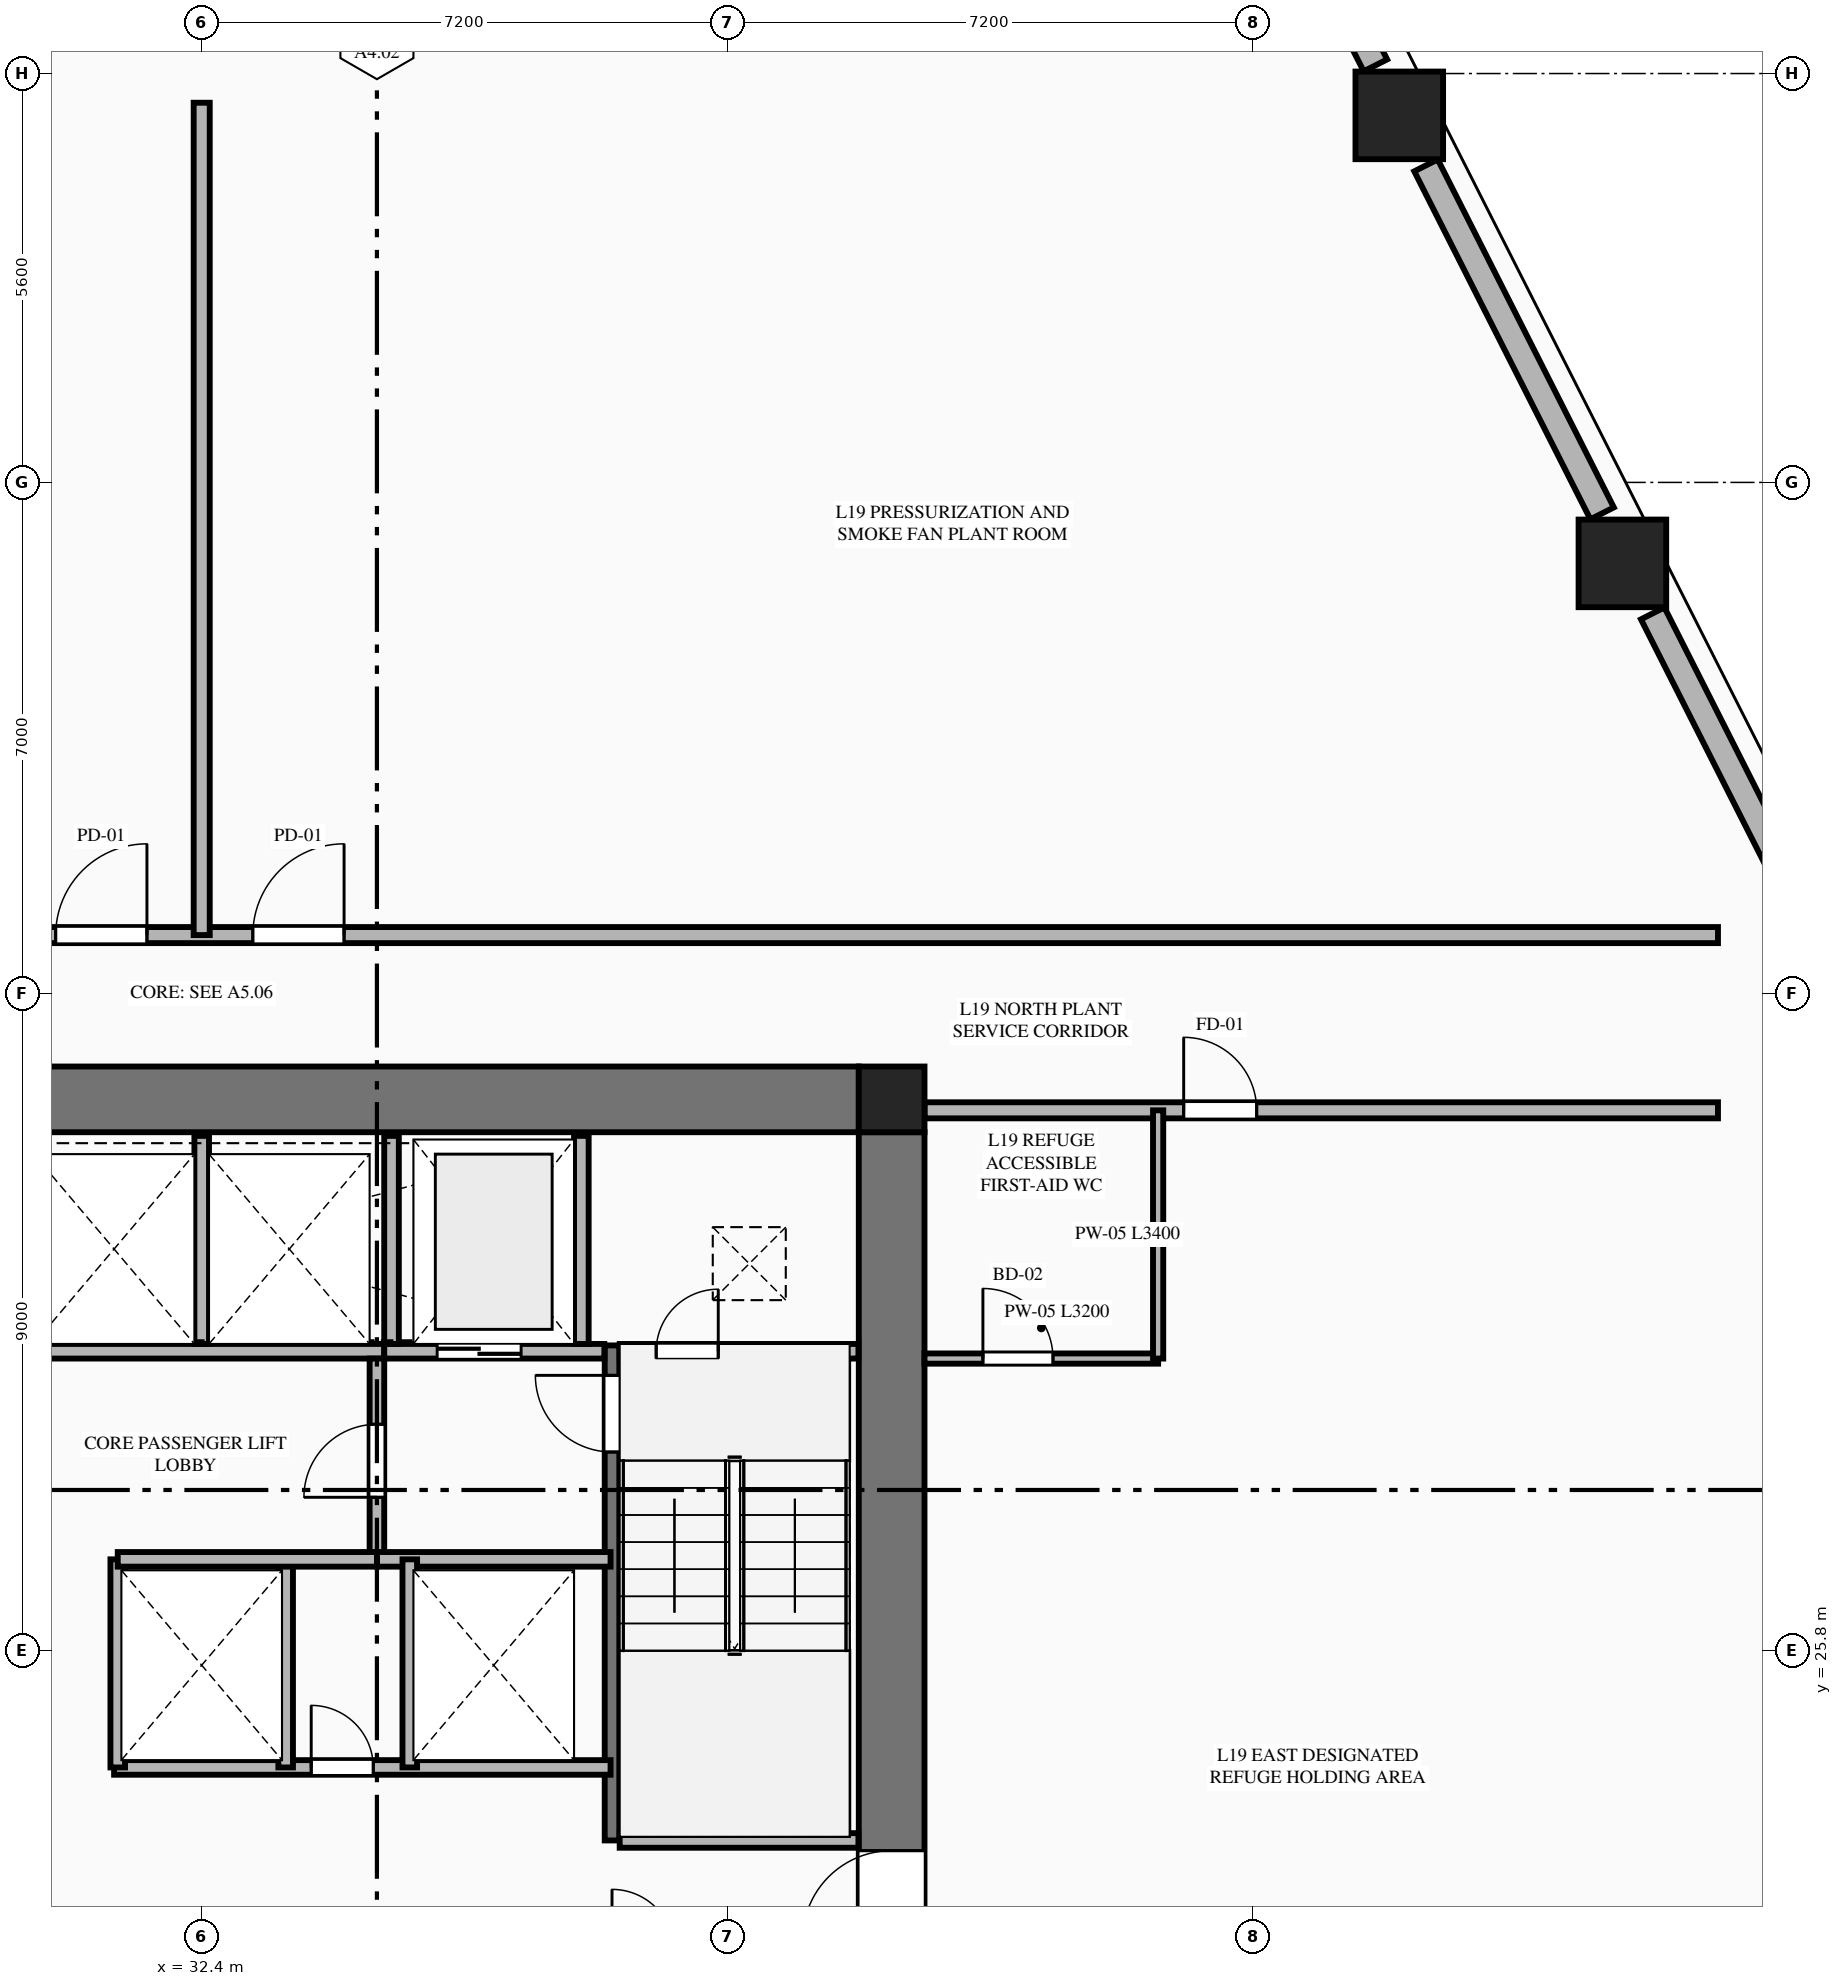
"""IFC4 building model, lengths in metres.
Left out: names, types, materials, properties, quantities, classifications, styles, units other than length and angle.
Written with IfcOpenShell. Run it as: python <this file> out.ifc"""

import sys

from ifc_helpers import new_model, si_unit, direction, frame, frame_2d, origin, origin_2d, place, context, subcontext, project, spatial, rectangle, extrude, element, fill, save


model = new_model("IFC4")
c1 = context("Model", 3, precision=1e-05, world=origin(), true_north=direction((0.0, 1.0)))
c2 = subcontext(c1, "Body", "Model", "MODEL_VIEW")
j1 = project(units=[si_unit("LENGTHUNIT", "METRE"), si_unit("PLANEANGLEUNIT", "RADIAN")], contexts=[c1])
p1 = place(None, origin())
s1 = spatial("IfcSite", under=j1, at=p1, CompositionType="ELEMENT")
p2 = place(p1, origin())
s2 = spatial("IfcBuilding", under=s1, at=p2, CompositionType="ELEMENT")
p3 = place(p2, frame((0.0, 0.0, 74.6)))
s3 = spatial("IfcBuildingStorey", under=s2, at=p3, CompositionType="ELEMENT", Elevation=74.6)
p4 = place(p3, frame((41.85, 33.35, 0.0), z_axis=(0.0, 0.0, 1.0), x_axis=(1.0, 0.0, 0.0)))
e1 = element("IfcColumn", 1, at=p4, inside=s3, PredefinedType="COLUMN", context=c2, shape_type="SweptSolid", body=[
    extrude(rectangle(XDim=0.9, YDim=0.9, at=origin_2d()), origin(), (0.0, 0.0, 1.0), 5.4),
])
p5 = place(p3, frame((23.4, 33.35, 0.0), z_axis=(0.0, 0.0, 1.0), x_axis=(1.0, 0.0, 0.0)))
e2 = element("IfcWall", 2, at=p5, inside=s3, PredefinedType="SHEAR", context=c2, shape_type="SweptSolid", body=[
    extrude(rectangle(XDim=18.0, YDim=0.9, at=frame_2d((9.0, 0.0))), origin(), (0.0, 0.0, 1.0), 5.18),
])
p6 = place(p3, frame((41.85, 18.9, 0.0), z_axis=(0.0, 0.0, 1.0), x_axis=(0.0, 1.0, 0.0)))
e3 = element("IfcWall", 3, at=p6, inside=s3, PredefinedType="SHEAR", context=c2, shape_type="SweptSolid", body=[
    extrude(rectangle(XDim=14.0, YDim=0.9, at=frame_2d((7.0, 0.0))), origin(), (0.0, 0.0, 1.0), 5.18),
])
p7 = place(p6, frame((2.94, 0.0, 0.0)))
e4 = element("IfcOpeningElement", 4, at=p7, cuts=e3, PredefinedType="OPENING", context=c2, shape_type="SweptSolid", body=[
    extrude(rectangle(XDim=1.22, YDim=2.25, at=frame_2d((0.61, 1.125))), frame((0.0, 0.46, 0.0), z_axis=(0.0, -1.0, 0.0), x_axis=(1.0, 0.0, 0.0)), (0.0, 0.0, 1.0), 0.92),
])
for number, where, z_axis, x_axis in (
    (5, (51.859, 40.691, 0.0), (0.0, 0.0, 1.0), (1.0, 0.0, 0.0)),
    (6, (48.803, 46.827, 0.0), (0.0, 0.0, 1.0), (1.0, 0.0, 0.0)),
):
    element("IfcColumn", number, at=place(p3, frame(where, z_axis=z_axis, x_axis=x_axis)), inside=s3, PredefinedType="COLUMN", context=c2, shape_type="SweptSolid", body=[
        extrude(rectangle(XDim=1.2, YDim=1.2, at=origin_2d()), origin(), (0.0, 0.0, 1.0), 5.4),
    ])
p8 = place(p3, frame((38.02, 23.2, 0.0), z_axis=(0.0, 0.0, 1.0), x_axis=(0.0, 1.0, 0.0)))
e7 = element("IfcWall", 7, at=p8, inside=s3, PredefinedType="SHEAR", context=c2, shape_type="SweptSolid", body=[
    extrude(rectangle(XDim=6.78, YDim=0.2, at=frame_2d((3.39, 0.0))), origin(), (0.0, 0.0, 1.0), 5.4),
])
p9 = place(p8, frame((5.32, 0.0, 0.0)))
e8 = element("IfcOpeningElement", 8, at=p9, cuts=e7, PredefinedType="OPENING", context=c2, shape_type="SweptSolid", body=[
    extrude(rectangle(XDim=1.05, YDim=2.15, at=frame_2d((0.525, 1.075))), frame((0.0, 0.11, 0.0), z_axis=(0.0, -1.0, 0.0), x_axis=(1.0, 0.0, 0.0)), (0.0, 0.0, 1.0), 0.22),
])
p10 = place(p3, frame((38.125, 23.2, 0.0), z_axis=(0.0, 0.0, 1.0), x_axis=(1.0, 0.0, 0.0)))
e9 = element("IfcWall", 9, at=p10, inside=s3, PredefinedType="PLUMBINGWALL", context=c2, shape_type="SweptSolid", body=[
    extrude(rectangle(XDim=3.27, YDim=0.2, at=frame_2d((1.635, 0.0))), origin(), (0.0, 0.0, 1.0), 5.18),
])
p11 = place(p3, frame((29.9, 29.9, 0.0), z_axis=(0.0, 0.0, 1.0), x_axis=(1.0, 0.0, 0.0)))
e10 = element("IfcWall", 10, at=p11, inside=s3, PredefinedType="PLUMBINGWALL", context=c2, shape_type="SweptSolid", body=[
    extrude(rectangle(XDim=5.0, YDim=0.2, at=frame_2d((2.5, 0.0))), origin(), (0.0, 0.0, 1.0), 5.18),
])
p12 = place(p3, frame((34.9, 29.9, 0.0), z_axis=(0.0, 0.0, 1.0), x_axis=(1.0, 0.0, 0.0)))
e11 = element("IfcWall", 11, at=p12, inside=s3, PredefinedType="PLUMBINGWALL", context=c2, shape_type="SweptSolid", body=[
    extrude(rectangle(XDim=3.015, YDim=0.2, at=frame_2d((1.508, 0.0))), origin(), (0.0, 0.0, 1.0), 5.18),
])
p13 = place(p12, frame((0.725, 0.0, 0.0)))
e12 = element("IfcOpeningElement", 12, at=p13, cuts=e11, PredefinedType="OPENING", context=c2, shape_type="SweptSolid", body=[
    extrude(rectangle(XDim=1.15, YDim=2.2, at=frame_2d((0.575, 1.1))), frame((0.0, 0.11, 0.0), z_axis=(0.0, -1.0, 0.0), x_axis=(1.0, 0.0, 0.0)), (0.0, 0.0, 1.0), 0.22),
])
p14 = place(p3, frame((38.125, 29.9, 0.0), z_axis=(0.0, 0.0, 1.0), x_axis=(1.0, 0.0, 0.0)))
e13 = element("IfcWall", 13, at=p14, inside=s3, PredefinedType="PLUMBINGWALL", context=c2, shape_type="SweptSolid", body=[
    extrude(rectangle(XDim=3.27, YDim=0.2, at=frame_2d((1.635, 0.0))), origin(), (0.0, 0.0, 1.0), 5.18),
])
p15 = place(p14, frame((0.5, 0.0, 0.0)))
e14 = element("IfcOpeningElement", 14, at=p15, cuts=e13, PredefinedType="OPENING", context=c2, shape_type="SweptSolid", body=[
    extrude(rectangle(XDim=0.85, YDim=2.05, at=frame_2d((0.425, 1.025))), frame((0.0, 0.11, 0.0), z_axis=(0.0, -1.0, 0.0), x_axis=(1.0, 0.0, 0.0)), (0.0, 0.0, 1.0), 0.22),
])
for number, where, z_axis, x_axis in (
    (15, (32.4, 30.0, 0.0), (0.0, 0.0, 1.0), (0.0, 1.0, 0.0)),
    (16, (35.0, 30.0, 0.0), (0.0, 0.0, 1.0), (0.0, 1.0, 0.0)),
    (17, (37.6, 30.0, 0.0), (0.0, 0.0, 1.0), (0.0, 1.0, 0.0)),
):
    element("IfcWall", number, at=place(p3, frame(where, z_axis=z_axis, x_axis=x_axis)), inside=s3, PredefinedType="PLUMBINGWALL", context=c2, shape_type="SweptSolid", body=[
        extrude(rectangle(XDim=2.85, YDim=0.2, at=frame_2d((1.425, 0.0))), origin(), (0.0, 0.0, 1.0), 5.18),
    ])
p16 = place(p3, frame((34.8, 27.05, 0.0), z_axis=(0.0, 0.0, 1.0), x_axis=(0.0, 1.0, 0.0)))
e18 = element("IfcWall", 18, at=p16, inside=s3, PredefinedType="PLUMBINGWALL", context=c2, shape_type="SweptSolid", body=[
    extrude(rectangle(XDim=2.75, YDim=0.2, at=frame_2d((1.375, 0.0))), origin(), (0.0, 0.0, 1.0), 5.18),
])
p17 = place(p16, frame((0.85, 0.0, 0.0)))
e19 = element("IfcOpeningElement", 19, at=p17, cuts=e18, PredefinedType="OPENING", context=c2, shape_type="SweptSolid", body=[
    extrude(rectangle(XDim=1.0, YDim=2.15, at=frame_2d((0.5, 1.075))), frame((0.0, 0.11, 0.0), z_axis=(0.0, -1.0, 0.0), x_axis=(1.0, 0.0, 0.0)), (0.0, 0.0, 1.0), 0.22),
])
p18 = place(p3, frame((34.8, 27.05, 0.0), z_axis=(0.0, 0.0, 1.0), x_axis=(1.0, 0.0, 0.0)))
e20 = element("IfcWall", 20, at=p18, inside=s3, PredefinedType="PLUMBINGWALL", context=c2, shape_type="SweptSolid", body=[
    extrude(rectangle(XDim=3.2, YDim=0.2, at=frame_2d((1.6, 0.0))), origin(), (0.0, 0.0, 1.0), 5.18),
])
p19 = place(p3, frame((31.2, 24.2, 0.0), z_axis=(0.0, 0.0, 1.0), x_axis=(1.0, 0.0, 0.0)))
e21 = element("IfcWall", 21, at=p19, inside=s3, PredefinedType="PLUMBINGWALL", context=c2, shape_type="SweptSolid", body=[
    extrude(rectangle(XDim=6.8, YDim=0.2, at=frame_2d((3.4, 0.0))), origin(), (0.0, 0.0, 1.0), 5.18),
])
p20 = place(p19, frame((2.7, 0.0, 0.0)))
e22 = element("IfcOpeningElement", 22, at=p20, cuts=e21, PredefinedType="OPENING", context=c2, shape_type="SweptSolid", body=[
    extrude(rectangle(XDim=0.85, YDim=2.05, at=frame_2d((0.425, 1.025))), frame((0.0, 0.11, 0.0), z_axis=(0.0, -1.0, 0.0), x_axis=(1.0, 0.0, 0.0)), (0.0, 0.0, 1.0), 0.22),
])
for number, where, z_axis, x_axis in (
    (23, (31.25, 24.2, 0.0), (0.0, 0.0, 1.0), (0.0, 1.0, 0.0)),
    (24, (33.55, 24.2, 0.0), (0.0, 0.0, 1.0), (0.0, 1.0, 0.0)),
    (25, (35.25, 24.2, 0.0), (0.0, 0.0, 1.0), (0.0, 1.0, 0.0)),
):
    element("IfcWall", number, at=place(p3, frame(where, z_axis=z_axis, x_axis=x_axis)), inside=s3, PredefinedType="PLUMBINGWALL", context=c2, shape_type="SweptSolid", body=[
        extrude(rectangle(XDim=2.85, YDim=0.2, at=frame_2d((1.425, 0.0))), origin(), (0.0, 0.0, 1.0), 5.18),
    ])
p21 = place(p3, frame((31.25, 27.05, 0.0), z_axis=(0.0, 0.0, 1.0), x_axis=(1.0, 0.0, 0.0)))
e26 = element("IfcWall", 26, at=p21, inside=s3, PredefinedType="PLUMBINGWALL", context=c2, shape_type="SweptSolid", body=[
    extrude(rectangle(XDim=3.55, YDim=0.2, at=frame_2d((1.775, 0.0))), origin(), (0.0, 0.0, 1.0), 5.18),
])
p22 = place(p3, frame((42.3, 33.2, 0.0), z_axis=(0.0, 0.0, 1.0), x_axis=(1.0, 0.0, 0.0)))
e27 = element("IfcWall", 27, at=p22, inside=s3, PredefinedType="PARTITIONING", context=c2, shape_type="SweptSolid", body=[
    extrude(rectangle(XDim=10.868, YDim=0.22, at=frame_2d((5.434, 0.0))), origin(), (0.0, 0.0, 1.0), 4.487),
])
p23 = place(p22, frame((3.55, 0.0, 0.0)))
e28 = element("IfcOpeningElement", 28, at=p23, cuts=e27, PredefinedType="OPENING", context=c2, shape_type="SweptSolid", body=[
    extrude(rectangle(XDim=1.0, YDim=2.15, at=frame_2d((0.5, 1.075))), frame((0.0, 0.12, 0.0), z_axis=(0.0, -1.0, 0.0), x_axis=(1.0, 0.0, 0.0)), (0.0, 0.0, 1.0), 0.24),
])
p24 = place(p3, frame((42.3, 29.8, 0.0), z_axis=(0.0, 0.0, 1.0), x_axis=(1.0, 0.0, 0.0)))
e29 = element("IfcWall", 29, at=p24, inside=s3, PredefinedType="PLUMBINGWALL", context=c2, shape_type="SweptSolid", body=[
    extrude(rectangle(XDim=3.2, YDim=0.14, at=frame_2d((1.6, 0.0))), origin(), (0.0, 0.0, 1.0), 5.18),
])
p25 = place(p24, frame((0.8, 0.0, 0.0)))
e30 = element("IfcOpeningElement", 30, at=p25, cuts=e29, PredefinedType="OPENING", context=c2, shape_type="SweptSolid", body=[
    extrude(rectangle(XDim=0.96, YDim=2.15, at=frame_2d((0.48, 1.075))), frame((0.0, 0.08, 0.0), z_axis=(0.0, -1.0, 0.0), x_axis=(1.0, 0.0, 0.0)), (0.0, 0.0, 1.0), 0.16),
])
p26 = place(p3, frame((45.5, 29.8, 0.0), z_axis=(0.0, 0.0, 1.0), x_axis=(0.0, 1.0, 0.0)))
e31 = element("IfcWall", 31, at=p26, inside=s3, PredefinedType="PLUMBINGWALL", context=c2, shape_type="SweptSolid", body=[
    extrude(rectangle(XDim=3.4, YDim=0.14, at=frame_2d((1.7, 0.0))), origin(), (0.0, 0.0, 1.0), 5.18),
])
p27 = place(p3, frame((11.632, 35.6, 0.0), z_axis=(0.0, 0.0, 1.0), x_axis=(1.0, 0.0, 0.0)))
e32 = element("IfcWall", 32, at=p27, inside=s3, PredefinedType="PARTITIONING", context=c2, shape_type="SweptSolid", body=[
    extrude(rectangle(XDim=41.536, YDim=0.22, at=frame_2d((20.768, 0.0))), origin(), (0.0, 0.0, 1.0), 5.18),
])
p28 = place(p27, frame((18.768, 0.0, 0.0)))
e33 = element("IfcOpeningElement", 33, at=p28, cuts=e32, PredefinedType="OPENING", context=c2, shape_type="SweptSolid", body=[
    extrude(rectangle(XDim=1.25, YDim=2.25, at=frame_2d((0.625, 1.125))), frame((0.0, 0.12, 0.0), z_axis=(0.0, -1.0, 0.0), x_axis=(1.0, 0.0, 0.0)), (0.0, 0.0, 1.0), 0.24),
])
p29 = place(p27, frame((21.468, 0.0, 0.0)))
e34 = element("IfcOpeningElement", 34, at=p29, cuts=e32, PredefinedType="OPENING", context=c2, shape_type="SweptSolid", body=[
    extrude(rectangle(XDim=1.25, YDim=2.25, at=frame_2d((0.625, 1.125))), frame((0.0, 0.12, 0.0), z_axis=(0.0, -1.0, 0.0), x_axis=(1.0, 0.0, 0.0)), (0.0, 0.0, 1.0), 0.24),
])
p30 = place(p3, frame((32.4, 35.6, 0.0), z_axis=(0.0, 0.0, 1.0), x_axis=(0.0, 1.0, 0.0)))
e35 = element("IfcWall", 35, at=p30, inside=s3, PredefinedType="PARTITIONING", context=c2, shape_type="SweptSolid", body=[
    extrude(rectangle(XDim=11.4, YDim=0.22, at=frame_2d((5.7, 0.0))), origin(), (0.0, 0.0, 1.0), 5.18),
])
p31 = place(p3, frame((54.774, 35.065, 0.0), z_axis=(0.0, 0.0, 1.0), x_axis=(-0.451458606243, 0.892292063648, 0.0)))
e36 = element("IfcWall", 36, at=p31, inside=s3, PredefinedType="STANDARD", context=c2, shape_type="SweptSolid", body=[
    extrude(rectangle(XDim=5.538, YDim=0.36, at=frame_2d((2.769, 0.0))), origin(), (0.0, 0.0, 1.0), 4.637),
])
p32 = place(p3, frame((51.581, 41.376, 0.0), z_axis=(0.0, 0.0, 1.0), x_axis=(-0.451559361714, 0.892241078884, 0.0)))
e37 = element("IfcWall", 37, at=p32, inside=s3, PredefinedType="STANDARD", context=c2, shape_type="SweptSolid", body=[
    extrude(rectangle(XDim=5.342, YDim=0.36, at=frame_2d((2.671, 0.0))), origin(), (0.0, 0.0, 1.0), 4.637),
])
p33 = place(p3, frame((48.476, 47.512, 0.0), z_axis=(0.0, 0.0, 1.0), x_axis=(-0.451418764337, 0.892312220697, 0.0)))
e38 = element("IfcWall", 38, at=p33, inside=s3, PredefinedType="STANDARD", context=c2, shape_type="SweptSolid", body=[
    extrude(rectangle(XDim=0.835, YDim=0.36, at=frame_2d((0.417, 0.0))), origin(), (0.0, 0.0, 1.0), 5.18),
])
p34 = place(p7, origin())
e39 = element("IfcDoor", 39, at=p34, inside=s3, OperationType="SINGLE_SWING_LEFT", PredefinedType="DOOR", context=c2, shape_type="SweptSolid", body=[
    extrude(rectangle(XDim=1.22, YDim=2.25, at=frame_2d((0.61, 1.125))), frame((0.0, 0.025, 0.0), z_axis=(0.0, -1.0, 0.0), x_axis=(1.0, 0.0, 0.0)), (0.0, 0.0, 1.0), 0.05),
])
fill(e4, e39)
p35 = place(p9, origin())
e40 = element("IfcDoor", 40, at=p35, inside=s3, OperationType="SINGLE_SWING_RIGHT", PredefinedType="DOOR", context=c2, shape_type="SweptSolid", body=[
    extrude(rectangle(XDim=1.05, YDim=2.15, at=frame_2d((0.525, 1.075))), frame((0.0, 0.025, 0.0), z_axis=(0.0, -1.0, 0.0), x_axis=(1.0, 0.0, 0.0)), (0.0, 0.0, 1.0), 0.05),
])
fill(e8, e40)
p36 = place(p15, origin())
e41 = element("IfcDoor", 41, at=p36, inside=s3, OperationType="SINGLE_SWING_RIGHT", PredefinedType="DOOR", context=c2, shape_type="SweptSolid", body=[
    extrude(rectangle(XDim=0.85, YDim=2.05, at=frame_2d((0.425, 1.025))), frame((0.0, 0.025, 0.0), z_axis=(0.0, -1.0, 0.0), x_axis=(1.0, 0.0, 0.0)), (0.0, 0.0, 1.0), 0.05),
])
fill(e14, e41)
p37 = place(p13, origin())
e42 = element("IfcDoor", 42, at=p37, inside=s3, OperationType="DOUBLE_DOOR_SLIDING", PredefinedType="DOOR", context=c2, shape_type="SweptSolid", body=[
    extrude(rectangle(XDim=1.15, YDim=2.2, at=frame_2d((0.575, 1.1))), frame((0.0, 0.025, 0.0), z_axis=(0.0, -1.0, 0.0), x_axis=(1.0, 0.0, 0.0)), (0.0, 0.0, 1.0), 0.05),
])
fill(e12, e42)
p38 = place(p17, origin())
e43 = element("IfcDoor", 43, at=p38, inside=s3, OperationType="SINGLE_SWING_LEFT", PredefinedType="DOOR", context=c2, shape_type="SweptSolid", body=[
    extrude(rectangle(XDim=1.0, YDim=2.15, at=frame_2d((0.5, 1.075))), frame((0.0, 0.025, 0.0), z_axis=(0.0, -1.0, 0.0), x_axis=(1.0, 0.0, 0.0)), (0.0, 0.0, 1.0), 0.05),
])
fill(e19, e43)
p39 = place(p20, origin())
e44 = element("IfcDoor", 44, at=p39, inside=s3, OperationType="SINGLE_SWING_LEFT", PredefinedType="DOOR", context=c2, shape_type="SweptSolid", body=[
    extrude(rectangle(XDim=0.85, YDim=2.05, at=frame_2d((0.425, 1.025))), frame((0.0, 0.025, 0.0), z_axis=(0.0, -1.0, 0.0), x_axis=(1.0, 0.0, 0.0)), (0.0, 0.0, 1.0), 0.05),
])
fill(e22, e44)
p40 = place(p25, origin())
e45 = element("IfcDoor", 45, at=p40, inside=s3, OperationType="SINGLE_SWING_LEFT", PredefinedType="DOOR", context=c2, shape_type="SweptSolid", body=[
    extrude(rectangle(XDim=0.96, YDim=2.15, at=frame_2d((0.48, 1.075))), frame((0.0, 0.025, 0.0), z_axis=(0.0, -1.0, 0.0), x_axis=(1.0, 0.0, 0.0)), (0.0, 0.0, 1.0), 0.05),
])
fill(e30, e45)
p41 = place(p23, origin())
e46 = element("IfcDoor", 46, at=p41, inside=s3, OperationType="SINGLE_SWING_LEFT", PredefinedType="DOOR", context=c2, shape_type="SweptSolid", body=[
    extrude(rectangle(XDim=1.0, YDim=2.15, at=frame_2d((0.5, 1.075))), frame((0.0, 0.025, 0.0), z_axis=(0.0, -1.0, 0.0), x_axis=(1.0, 0.0, 0.0)), (0.0, 0.0, 1.0), 0.05),
])
fill(e28, e46)
p42 = place(p28, origin())
e47 = element("IfcDoor", 47, at=p42, inside=s3, OperationType="SINGLE_SWING_RIGHT", PredefinedType="DOOR", context=c2, shape_type="SweptSolid", body=[
    extrude(rectangle(XDim=1.25, YDim=2.25, at=frame_2d((0.625, 1.125))), frame((0.0, 0.025, 0.0), z_axis=(0.0, -1.0, 0.0), x_axis=(1.0, 0.0, 0.0)), (0.0, 0.0, 1.0), 0.05),
])
fill(e33, e47)
p43 = place(p29, origin())
e48 = element("IfcDoor", 48, at=p43, inside=s3, OperationType="SINGLE_SWING_RIGHT", PredefinedType="DOOR", context=c2, shape_type="SweptSolid", body=[
    extrude(rectangle(XDim=1.25, YDim=2.25, at=frame_2d((0.625, 1.125))), frame((0.0, 0.025, 0.0), z_axis=(0.0, -1.0, 0.0), x_axis=(1.0, 0.0, 0.0)), (0.0, 0.0, 1.0), 0.05),
])
fill(e34, e48)
save(model, sys.argv[1])
